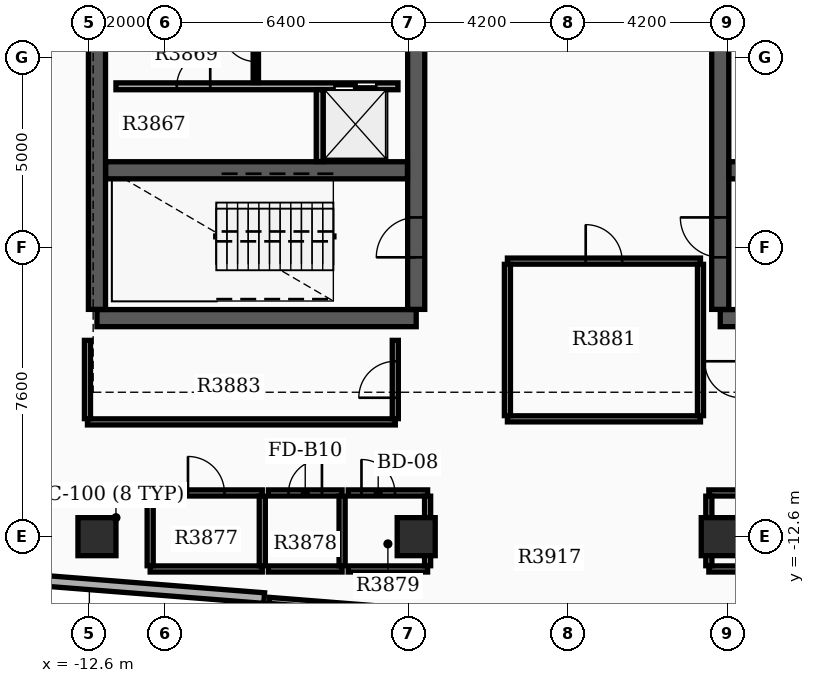
"""IFC4 building model, lengths in metres.
Left out: names, types, materials, properties, quantities, classifications, styles, units other than length and angle.
Written with IfcOpenShell. Run it as: python <this file> out.ifc"""

import sys

from ifc_helpers import new_model, si_unit, direction, frame, frame_2d, origin, origin_2d, place, context, subcontext, project, spatial, rectangle, extrude, element, fill, save


model = new_model("IFC4")
c1 = context("Model", 3, precision=1e-05, world=origin(), true_north=direction((0.0, 1.0)))
c2 = subcontext(c1, "Body", "Model", "MODEL_VIEW")
j1 = project(units=[si_unit("LENGTHUNIT", "METRE"), si_unit("PLANEANGLEUNIT", "RADIAN")], contexts=[c1])
p1 = place(None, origin())
s1 = spatial("IfcSite", under=j1, at=p1, CompositionType="ELEMENT")
p2 = place(p1, origin())
s2 = spatial("IfcBuilding", under=s1, at=p2, CompositionType="ELEMENT")
p3 = place(p2, frame((0.0, 0.0, 245.4)))
s3 = spatial("IfcBuildingStorey", under=s2, at=p3, CompositionType="ELEMENT", Elevation=245.4)
p4 = place(p3, frame((-12.4, -6.85, 0.0), z_axis=(0.0, 0.0, 1.0), x_axis=(1.0, 0.0, 0.0)))
e1 = element("IfcWall", 1, at=p4, inside=s3, PredefinedType="SHEAR", context=c2, shape_type="SweptSolid", body=[
    extrude(rectangle(XDim=8.4, YDim=0.45, at=frame_2d((4.2, 0.0))), origin(), (0.0, 0.0, 1.0), 4.3),
])
p5 = place(p3, frame((-12.4, -6.62, 0.0), z_axis=(0.0, 0.0, 1.0), x_axis=(0.0, 1.0, 0.0)))
e2 = element("IfcWall", 2, at=p5, inside=s3, PredefinedType="SHEAR", context=c2, shape_type="SweptSolid", body=[
    extrude(rectangle(XDim=11.34, YDim=0.45, at=frame_2d((5.67, 0.0))), origin(), (0.0, 0.0, 1.0), 4.3),
])
p6 = place(p3, frame((-4.0, -6.62, 0.0), z_axis=(0.0, 0.0, 1.0), x_axis=(0.0, 1.0, 0.0)))
e3 = element("IfcWall", 3, at=p6, inside=s3, PredefinedType="SHEAR", context=c2, shape_type="SweptSolid", body=[
    extrude(rectangle(XDim=11.34, YDim=0.45, at=frame_2d((5.67, 0.0))), origin(), (0.0, 0.0, 1.0), 4.3),
])
p7 = place(p6, frame((1.37, 0.0, 0.0)))
e4 = element("IfcOpeningElement", 4, at=p7, cuts=e3, PredefinedType="OPENING", context=c2, shape_type="SweptSolid", body=[
    extrude(rectangle(XDim=1.05, YDim=2.15, at=frame_2d((0.525, 1.075))), frame((0.0, 0.235, 0.0), z_axis=(0.0, -1.0, 0.0), x_axis=(1.0, 0.0, 0.0)), (0.0, 0.0, 1.0), 0.47),
])
p8 = place(p6, frame((6.97, 0.0, 0.0)))
e5 = element("IfcOpeningElement", 5, at=p8, cuts=e3, PredefinedType="OPENING", context=c2, shape_type="SweptSolid", body=[
    extrude(rectangle(XDim=1.05, YDim=2.15, at=frame_2d((0.525, 1.075))), frame((0.0, 0.235, 0.0), z_axis=(0.0, -1.0, 0.0), x_axis=(1.0, 0.0, 0.0)), (0.0, 0.0, 1.0), 0.47),
])
p9 = place(p3, frame((-12.17, -2.96, 0.0), z_axis=(0.0, 0.0, 1.0), x_axis=(1.0, 0.0, 0.0)))
e6 = element("IfcWall", 6, at=p9, inside=s3, PredefinedType="SHEAR", context=c2, shape_type="SweptSolid", body=[
    extrude(rectangle(XDim=7.94, YDim=0.45, at=frame_2d((3.97, 0.0))), origin(), (0.0, 0.0, 1.0), 4.3),
])
p10 = place(p3, frame((4.0, -6.85, 0.0), z_axis=(0.0, 0.0, 1.0), x_axis=(1.0, 0.0, 0.0)))
e7 = element("IfcWall", 7, at=p10, inside=s3, PredefinedType="SHEAR", context=c2, shape_type="SweptSolid", body=[
    extrude(rectangle(XDim=8.4, YDim=0.45, at=frame_2d((4.2, 0.0))), origin(), (0.0, 0.0, 1.0), 4.3),
])
p11 = place(p3, frame((4.0, -6.62, 0.0), z_axis=(0.0, 0.0, 1.0), x_axis=(0.0, 1.0, 0.0)))
e8 = element("IfcWall", 8, at=p11, inside=s3, PredefinedType="SHEAR", context=c2, shape_type="SweptSolid", body=[
    extrude(rectangle(XDim=11.34, YDim=0.45, at=frame_2d((5.67, 0.0))), origin(), (0.0, 0.0, 1.0), 4.3),
])
p12 = place(p11, frame((1.37, 0.0, 0.0)))
e9 = element("IfcOpeningElement", 9, at=p12, cuts=e8, PredefinedType="OPENING", context=c2, shape_type="SweptSolid", body=[
    extrude(rectangle(XDim=1.05, YDim=2.15, at=frame_2d((0.525, 1.075))), frame((0.0, 0.235, 0.0), z_axis=(0.0, -1.0, 0.0), x_axis=(1.0, 0.0, 0.0)), (0.0, 0.0, 1.0), 0.47),
])
p13 = place(p11, frame((6.97, 0.0, 0.0)))
e10 = element("IfcOpeningElement", 10, at=p13, cuts=e8, PredefinedType="OPENING", context=c2, shape_type="SweptSolid", body=[
    extrude(rectangle(XDim=1.05, YDim=2.15, at=frame_2d((0.525, 1.075))), frame((0.0, 0.235, 0.0), z_axis=(0.0, -1.0, 0.0), x_axis=(1.0, 0.0, 0.0)), (0.0, 0.0, 1.0), 0.47),
])
p14 = place(p3, frame((4.23, -2.96, 0.0), z_axis=(0.0, 0.0, 1.0), x_axis=(1.0, 0.0, 0.0)))
e11 = element("IfcWall", 11, at=p14, inside=s3, PredefinedType="SHEAR", context=c2, shape_type="SweptSolid", body=[
    extrude(rectangle(XDim=7.94, YDim=0.45, at=frame_2d((3.97, 0.0))), origin(), (0.0, 0.0, 1.0), 4.3),
])
for number, where, z_axis, x_axis in (
    (12, (-12.4, -12.6, 0.0), (0.0, 0.0, 1.0), (1.0, 0.0, 0.0)),
    (13, (-4.0, -12.6, 0.0), (0.0, 0.0, 1.0), (1.0, 0.0, 0.0)),
    (14, (4.0, -12.6, 0.0), (0.0, 0.0, 1.0), (1.0, 0.0, 0.0)),
):
    element("IfcColumn", number, at=place(p3, frame(where, z_axis=z_axis, x_axis=x_axis)), inside=s3, PredefinedType="COLUMN", context=c2, shape_type="SweptSolid", body=[
        extrude(rectangle(XDim=1.0, YDim=1.0, at=origin_2d()), origin(), (0.0, 0.0, 1.0), 4.5),
    ])
p15 = place(p3, frame((-7.872, -14.367, 0.0), z_axis=(0.0, 0.0, 1.0), x_axis=(-0.078456642068, -0.996917526837, 0.0)))
e15 = element("IfcWall", 15, at=p15, inside=s3, PredefinedType="STANDARD", context=c2, shape_type="SweptSolid", body=[
    extrude(rectangle(XDim=14.7, YDim=0.28, at=frame_2d((7.35, 0.0))), origin(), (0.0, 0.0, 1.0), 3.38),
])
p16 = place(p15, frame((1.6, 0.0, 0.8)))
e16 = element("IfcOpeningElement", 16, at=p16, cuts=e15, PredefinedType="OPENING", context=c2, shape_type="SweptSolid", body=[
    extrude(rectangle(XDim=1.6, YDim=1.7, at=frame_2d((0.8, 0.85))), frame((0.0, 0.15, 0.0), z_axis=(0.0, -1.0, 0.0), x_axis=(1.0, 0.0, 0.0)), (0.0, 0.0, 1.0), 0.3),
])
p17 = place(p15, frame((4.8, 0.0, 0.8)))
e17 = element("IfcOpeningElement", 17, at=p17, cuts=e15, PredefinedType="OPENING", context=c2, shape_type="SweptSolid", body=[
    extrude(rectangle(XDim=1.6, YDim=1.7, at=frame_2d((0.8, 0.85))), frame((0.0, 0.15, 0.0), z_axis=(0.0, -1.0, 0.0), x_axis=(1.0, 0.0, 0.0)), (0.0, 0.0, 1.0), 0.3),
])
p18 = place(p15, frame((8.75, 0.0, 0.8)))
e18 = element("IfcOpeningElement", 18, at=p18, cuts=e15, PredefinedType="OPENING", context=c2, shape_type="SweptSolid", body=[
    extrude(rectangle(XDim=1.6, YDim=1.7, at=frame_2d((0.8, 0.85))), frame((0.0, 0.15, 0.0), z_axis=(0.0, -1.0, 0.0), x_axis=(1.0, 0.0, 0.0)), (0.0, 0.0, 1.0), 0.3),
])
p19 = place(p15, frame((11.95, 0.0, 0.8)))
e19 = element("IfcOpeningElement", 19, at=p19, cuts=e15, PredefinedType="OPENING", context=c2, shape_type="SweptSolid", body=[
    extrude(rectangle(XDim=1.6, YDim=1.7, at=frame_2d((0.8, 0.85))), frame((0.0, 0.15, 0.0), z_axis=(0.0, -1.0, 0.0), x_axis=(1.0, 0.0, 0.0)), (0.0, 0.0, 1.0), 0.3),
])
p20 = place(p3, frame((-14.281, -13.722, 0.0), z_axis=(0.0, 0.0, 1.0), x_axis=(0.99691915642, -0.078435932851, 0.0)))
e20 = element("IfcWall", 20, at=p20, inside=s3, PredefinedType="STANDARD", context=c2, shape_type="SweptSolid", body=[
    extrude(rectangle(XDim=6.3, YDim=0.28, at=frame_2d((3.15, 0.0))), origin(), (0.0, 0.0, 1.0), 3.38),
])
p21 = place(p3, frame((-11.9, -0.75, 0.0), z_axis=(0.0, 0.0, 1.0), x_axis=(1.0, 0.0, 0.0)))
e21 = element("IfcWall", 21, at=p21, inside=s3, PredefinedType="SOLIDWALL", context=c2, shape_type="SweptSolid", body=[
    extrude(rectangle(XDim=7.42, YDim=0.18, at=frame_2d((3.71, 0.0))), origin(), (0.0, 0.0, 1.0), 3.37),
])
p22 = place(p21, frame((5.75, 0.0, 0.0)))
e22 = element("IfcOpeningElement", 22, at=p22, cuts=e21, PredefinedType="OPENING", context=c2, shape_type="SweptSolid", body=[
    extrude(rectangle(XDim=1.1, YDim=2.15, at=frame_2d((0.55, 1.075))), frame((0.0, 0.1, 0.0), z_axis=(0.0, -1.0, 0.0), x_axis=(1.0, 0.0, 0.0)), (0.0, 0.0, 1.0), 0.2),
])
p23 = place(p21, frame((1.6, 0.0, 0.0)))
e23 = element("IfcOpeningElement", 23, at=p23, cuts=e21, PredefinedType="OPENING", context=c2, shape_type="SweptSolid", body=[
    extrude(rectangle(XDim=0.88, YDim=2.1, at=frame_2d((0.44, 1.05))), frame((0.0, 0.1, 0.0), z_axis=(0.0, -1.0, 0.0), x_axis=(1.0, 0.0, 0.0)), (0.0, 0.0, 1.0), 0.2),
])
p24 = place(p3, frame((-6.54, -2.73, 0.0), z_axis=(0.0, 0.0, 1.0), x_axis=(0.0, 1.0, 0.0)))
e24 = element("IfcWall", 24, at=p24, inside=s3, PredefinedType="SOLIDWALL", context=c2, shape_type="SweptSolid", body=[
    extrude(rectangle(XDim=1.89, YDim=0.18, at=frame_2d((0.945, 0.0))), origin(), (0.0, 0.0, 1.0), 3.37),
])
p25 = place(p3, frame((-8.22, -0.65, 0.0), z_axis=(0.0, 0.0, 1.0), x_axis=(0.0, 1.0, 0.0)))
e25 = element("IfcWall", 25, at=p25, inside=s3, PredefinedType="SOLIDWALL", context=c2, shape_type="SweptSolid", body=[
    extrude(rectangle(XDim=2.96, YDim=0.14, at=frame_2d((1.48, 0.0))), origin(), (0.0, 0.0, 1.0), 3.37),
])
p26 = place(p25, frame((0.55, 0.0, 0.0)))
e26 = element("IfcOpeningElement", 26, at=p26, cuts=e25, PredefinedType="OPENING", context=c2, shape_type="SweptSolid", body=[
    extrude(rectangle(XDim=0.88, YDim=2.1, at=frame_2d((0.44, 1.05))), frame((0.0, 0.08, 0.0), z_axis=(0.0, -1.0, 0.0), x_axis=(1.0, 0.0, 0.0)), (0.0, 0.0, 1.0), 0.16),
])
p27 = place(p3, frame((3.7, -13.45, 0.0), z_axis=(0.0, 0.0, 1.0), x_axis=(1.0, 0.0, 0.0)))
e27 = element("IfcWall", 27, at=p27, inside=s3, PredefinedType="PARTITIONING", context=c2, shape_type="SweptSolid", body=[
    extrude(rectangle(XDim=7.3, YDim=0.16, at=frame_2d((3.65, 0.0))), origin(), (0.0, 0.0, 1.0), 3.37),
])
p28 = place(p3, frame((3.7, -11.45, 0.0), z_axis=(0.0, 0.0, 1.0), x_axis=(1.0, 0.0, 0.0)))
e28 = element("IfcWall", 28, at=p28, inside=s3, PredefinedType="PARTITIONING", context=c2, shape_type="SweptSolid", body=[
    extrude(rectangle(XDim=7.3, YDim=0.16, at=frame_2d((3.65, 0.0))), origin(), (0.0, 0.0, 1.0), 3.37),
])
p29 = place(p28, frame((3.17, 0.0, 0.0)))
e29 = element("IfcOpeningElement", 29, at=p29, cuts=e28, PredefinedType="OPENING", context=c2, shape_type="SweptSolid", body=[
    extrude(rectangle(XDim=0.96, YDim=2.15, at=frame_2d((0.48, 1.075))), frame((0.0, 0.09, 0.0), z_axis=(0.0, -1.0, 0.0), x_axis=(1.0, 0.0, 0.0)), (0.0, 0.0, 1.0), 0.18),
])
p30 = place(p3, frame((3.7, -13.365, 0.0), z_axis=(0.0, 0.0, 1.0), x_axis=(0.0, 1.0, 0.0)))
e30 = element("IfcWall", 30, at=p30, inside=s3, PredefinedType="PARTITIONING", context=c2, shape_type="SweptSolid", body=[
    extrude(rectangle(XDim=1.83, YDim=0.16, at=frame_2d((0.915, 0.0))), origin(), (0.0, 0.0, 1.0), 3.37),
])
p31 = place(p3, frame((-11.0, -13.45, 0.0), z_axis=(0.0, 0.0, 1.0), x_axis=(1.0, 0.0, 0.0)))
e31 = element("IfcWall", 31, at=p31, inside=s3, PredefinedType="PARTITIONING", context=c2, shape_type="SweptSolid", body=[
    extrude(rectangle(XDim=2.95, YDim=0.16, at=frame_2d((1.475, 0.0))), origin(), (0.0, 0.0, 1.0), 3.37),
])
p32 = place(p3, frame((-11.0, -11.45, 0.0), z_axis=(0.0, 0.0, 1.0), x_axis=(1.0, 0.0, 0.0)))
e32 = element("IfcWall", 32, at=p32, inside=s3, PredefinedType="PARTITIONING", context=c2, shape_type="SweptSolid", body=[
    extrude(rectangle(XDim=2.95, YDim=0.16, at=frame_2d((1.475, 0.0))), origin(), (0.0, 0.0, 1.0), 3.37),
])
p33 = place(p32, frame((0.995, 0.0, 0.0)))
e33 = element("IfcOpeningElement", 33, at=p33, cuts=e32, PredefinedType="OPENING", context=c2, shape_type="SweptSolid", body=[
    extrude(rectangle(XDim=0.96, YDim=2.15, at=frame_2d((0.48, 1.075))), frame((0.0, 0.09, 0.0), z_axis=(0.0, -1.0, 0.0), x_axis=(1.0, 0.0, 0.0)), (0.0, 0.0, 1.0), 0.18),
])
for number, where, z_axis, x_axis in (
    (34, (-11.0, -13.365, 0.0), (0.0, 0.0, 1.0), (0.0, 1.0, 0.0)),
    (35, (-8.05, -13.365, 0.0), (0.0, 0.0, 1.0), (0.0, 1.0, 0.0)),
):
    element("IfcWall", number, at=place(p3, frame(where, z_axis=z_axis, x_axis=x_axis)), inside=s3, PredefinedType="PARTITIONING", context=c2, shape_type="SweptSolid", body=[
        extrude(rectangle(XDim=1.83, YDim=0.16, at=frame_2d((0.915, 0.0))), origin(), (0.0, 0.0, 1.0), 3.37),
    ])
p34 = place(p3, frame((-7.89, -13.45, 0.0), z_axis=(0.0, 0.0, 1.0), x_axis=(1.0, 0.0, 0.0)))
e36 = element("IfcWall", 36, at=p34, inside=s3, PredefinedType="PARTITIONING", context=c2, shape_type="SweptSolid", body=[
    extrude(rectangle(XDim=1.94, YDim=0.16, at=frame_2d((0.97, 0.0))), origin(), (0.0, 0.0, 1.0), 3.37),
])
p35 = place(p3, frame((-7.89, -11.45, 0.0), z_axis=(0.0, 0.0, 1.0), x_axis=(1.0, 0.0, 0.0)))
e37 = element("IfcWall", 37, at=p35, inside=s3, PredefinedType="PARTITIONING", context=c2, shape_type="SweptSolid", body=[
    extrude(rectangle(XDim=1.94, YDim=0.16, at=frame_2d((0.97, 0.0))), origin(), (0.0, 0.0, 1.0), 3.37),
])
p36 = place(p35, frame((0.53, 0.0, 0.0)))
e38 = element("IfcOpeningElement", 38, at=p36, cuts=e37, PredefinedType="OPENING", context=c2, shape_type="SweptSolid", body=[
    extrude(rectangle(XDim=0.88, YDim=2.1, at=frame_2d((0.44, 1.05))), frame((0.0, 0.09, 0.0), z_axis=(0.0, -1.0, 0.0), x_axis=(1.0, 0.0, 0.0)), (0.0, 0.0, 1.0), 0.18),
])
p37 = place(p3, frame((-5.95, -13.365, 0.0), z_axis=(0.0, 0.0, 1.0), x_axis=(0.0, 1.0, 0.0)))
e39 = element("IfcWall", 39, at=p37, inside=s3, PredefinedType="PARTITIONING", context=c2, shape_type="SweptSolid", body=[
    extrude(rectangle(XDim=1.83, YDim=0.16, at=frame_2d((0.915, 0.0))), origin(), (0.0, 0.0, 1.0), 3.37),
])
p38 = place(p3, frame((-5.79, -13.45, 0.0), z_axis=(0.0, 0.0, 1.0), x_axis=(1.0, 0.0, 0.0)))
e40 = element("IfcWall", 40, at=p38, inside=s3, PredefinedType="PARTITIONING", context=c2, shape_type="SweptSolid", body=[
    extrude(rectangle(XDim=2.09, YDim=0.16, at=frame_2d((1.045, 0.0))), origin(), (0.0, 0.0, 1.0), 3.37),
])
p39 = place(p3, frame((-5.79, -11.45, 0.0), z_axis=(0.0, 0.0, 1.0), x_axis=(1.0, 0.0, 0.0)))
e41 = element("IfcWall", 41, at=p39, inside=s3, PredefinedType="PARTITIONING", context=c2, shape_type="SweptSolid", body=[
    extrude(rectangle(XDim=2.09, YDim=0.16, at=frame_2d((1.045, 0.0))), origin(), (0.0, 0.0, 1.0), 3.37),
])
p40 = place(p39, frame((0.35, 0.0, 0.0)))
e42 = element("IfcOpeningElement", 42, at=p40, cuts=e41, PredefinedType="OPENING", context=c2, shape_type="SweptSolid", body=[
    extrude(rectangle(XDim=0.88, YDim=2.15, at=frame_2d((0.44, 1.075))), frame((0.0, 0.09, 0.0), z_axis=(0.0, -1.0, 0.0), x_axis=(1.0, 0.0, 0.0)), (0.0, 0.0, 1.0), 0.18),
])
p41 = place(p3, frame((-3.7, -13.365, 0.0), z_axis=(0.0, 0.0, 1.0), x_axis=(0.0, 1.0, 0.0)))
e43 = element("IfcWall", 43, at=p41, inside=s3, PredefinedType="PARTITIONING", context=c2, shape_type="SweptSolid", body=[
    extrude(rectangle(XDim=1.83, YDim=0.16, at=frame_2d((0.915, 0.0))), origin(), (0.0, 0.0, 1.0), 3.37),
])
p42 = place(p3, frame((-1.6, -9.5, 0.0), z_axis=(0.0, 0.0, 1.0), x_axis=(1.0, 0.0, 0.0)))
e44 = element("IfcWall", 44, at=p42, inside=s3, PredefinedType="PARTITIONING", context=c2, shape_type="SweptSolid", body=[
    extrude(rectangle(XDim=5.08, YDim=0.16, at=frame_2d((2.54, 0.0))), origin(), (0.0, 0.0, 1.0), 3.37),
])
p43 = place(p3, frame((-1.6, -5.35, 0.0), z_axis=(0.0, 0.0, 1.0), x_axis=(1.0, 0.0, 0.0)))
e45 = element("IfcWall", 45, at=p43, inside=s3, PredefinedType="PARTITIONING", context=c2, shape_type="SweptSolid", body=[
    extrude(rectangle(XDim=5.08, YDim=0.16, at=frame_2d((2.54, 0.0))), origin(), (0.0, 0.0, 1.0), 3.37),
])
p44 = place(p43, frame((2.06, 0.0, 0.0)))
e46 = element("IfcOpeningElement", 46, at=p44, cuts=e45, PredefinedType="OPENING", context=c2, shape_type="SweptSolid", body=[
    extrude(rectangle(XDim=0.96, YDim=2.15, at=frame_2d((0.48, 1.075))), frame((0.0, 0.09, 0.0), z_axis=(0.0, -1.0, 0.0), x_axis=(1.0, 0.0, 0.0)), (0.0, 0.0, 1.0), 0.18),
])
for number, where, z_axis, x_axis in (
    (47, (-1.6, -9.415, 0.0), (0.0, 0.0, 1.0), (0.0, 1.0, 0.0)),
    (48, (3.48, -9.415, 0.0), (0.0, 0.0, 1.0), (0.0, 1.0, 0.0)),
):
    element("IfcWall", number, at=place(p3, frame(where, z_axis=z_axis, x_axis=x_axis)), inside=s3, PredefinedType="PARTITIONING", context=c2, shape_type="SweptSolid", body=[
        extrude(rectangle(XDim=3.98, YDim=0.16, at=frame_2d((1.99, 0.0))), origin(), (0.0, 0.0, 1.0), 3.37),
    ])
p45 = place(p3, frame((-12.65, -9.58, 0.0), z_axis=(0.0, 0.0, 1.0), x_axis=(1.0, 0.0, 0.0)))
e49 = element("IfcWall", 49, at=p45, inside=s3, PredefinedType="PARTITIONING", context=c2, shape_type="SweptSolid", body=[
    extrude(rectangle(XDim=8.1, YDim=0.16, at=frame_2d((4.05, 0.0))), origin(), (0.0, 0.0, 1.0), 3.37),
])
p46 = place(p3, frame((-12.65, -9.495, 0.0), z_axis=(0.0, 0.0, 1.0), x_axis=(0.0, 1.0, 0.0)))
e50 = element("IfcWall", 50, at=p46, inside=s3, PredefinedType="PARTITIONING", context=c2, shape_type="SweptSolid", body=[
    extrude(rectangle(XDim=2.06, YDim=0.16, at=frame_2d((1.03, 0.0))), origin(), (0.0, 0.0, 1.0), 3.37),
])
p47 = place(p3, frame((-4.55, -9.495, 0.0), z_axis=(0.0, 0.0, 1.0), x_axis=(0.0, 1.0, 0.0)))
e51 = element("IfcWall", 51, at=p47, inside=s3, PredefinedType="PARTITIONING", context=c2, shape_type="SweptSolid", body=[
    extrude(rectangle(XDim=2.06, YDim=0.16, at=frame_2d((1.03, 0.0))), origin(), (0.0, 0.0, 1.0), 3.37),
])
p48 = place(p47, frame((0.55, 0.0, 0.0)))
e52 = element("IfcOpeningElement", 52, at=p48, cuts=e51, PredefinedType="OPENING", context=c2, shape_type="SweptSolid", body=[
    extrude(rectangle(XDim=0.96, YDim=2.15, at=frame_2d((0.48, 1.075))), frame((0.0, 0.09, 0.0), z_axis=(0.0, -1.0, 0.0), x_axis=(1.0, 0.0, 0.0)), (0.0, 0.0, 1.0), 0.18),
])
p49 = place(p3, frame((-1.285, -14.795, 0.0), z_axis=(0.0, 0.0, 1.0), x_axis=(-0.996917593255, 0.078455798126, 0.0)))
e53 = element("IfcWall", 53, at=p49, inside=s3, PredefinedType="PARTITIONING", context=c2, shape_type="SweptSolid", body=[
    extrude(rectangle(XDim=6.6, YDim=0.16, at=frame_2d((3.3, 0.0))), origin(), (0.0, 0.0, 1.0), 3.37),
])
p50 = place(p7, origin())
e54 = element("IfcDoor", 54, at=p50, inside=s3, OperationType="SINGLE_SWING_LEFT", PredefinedType="DOOR", context=c2, shape_type="SweptSolid", body=[
    extrude(rectangle(XDim=1.05, YDim=2.15, at=frame_2d((0.525, 1.075))), frame((0.0, 0.025, 0.0), z_axis=(0.0, -1.0, 0.0), x_axis=(1.0, 0.0, 0.0)), (0.0, 0.0, 1.0), 0.05),
])
fill(e4, e54)
p51 = place(p12, origin())
e55 = element("IfcDoor", 55, at=p51, inside=s3, OperationType="SINGLE_SWING_RIGHT", PredefinedType="DOOR", context=c2, shape_type="SweptSolid", body=[
    extrude(rectangle(XDim=1.05, YDim=2.15, at=frame_2d((0.525, 1.075))), frame((0.0, 0.025, 0.0), z_axis=(0.0, -1.0, 0.0), x_axis=(1.0, 0.0, 0.0)), (0.0, 0.0, 1.0), 0.05),
])
fill(e9, e55)
p52 = place(p22, origin())
e56 = element("IfcDoor", 56, at=p52, inside=s3, OperationType="DOUBLE_DOOR_SLIDING", PredefinedType="DOOR", context=c2, shape_type="SweptSolid", body=[
    extrude(rectangle(XDim=1.1, YDim=2.15, at=frame_2d((0.55, 1.075))), frame((0.0, 0.025, 0.0), z_axis=(0.0, -1.0, 0.0), x_axis=(1.0, 0.0, 0.0)), (0.0, 0.0, 1.0), 0.05),
])
fill(e22, e56)
p53 = place(p23, origin())
e57 = element("IfcDoor", 57, at=p53, inside=s3, OperationType="SINGLE_SWING_RIGHT", PredefinedType="DOOR", context=c2, shape_type="SweptSolid", body=[
    extrude(rectangle(XDim=0.88, YDim=2.1, at=frame_2d((0.44, 1.05))), frame((0.0, 0.025, 0.0), z_axis=(0.0, -1.0, 0.0), x_axis=(1.0, 0.0, 0.0)), (0.0, 0.0, 1.0), 0.05),
])
fill(e23, e57)
p54 = place(p26, origin())
e58 = element("IfcDoor", 58, at=p54, inside=s3, OperationType="SINGLE_SWING_RIGHT", PredefinedType="DOOR", context=c2, shape_type="SweptSolid", body=[
    extrude(rectangle(XDim=0.88, YDim=2.1, at=frame_2d((0.44, 1.05))), frame((0.0, 0.025, 0.0), z_axis=(0.0, -1.0, 0.0), x_axis=(1.0, 0.0, 0.0)), (0.0, 0.0, 1.0), 0.05),
])
fill(e26, e58)
p55 = place(p33, origin())
e59 = element("IfcDoor", 59, at=p55, inside=s3, OperationType="SINGLE_SWING_LEFT", PredefinedType="DOOR", context=c2, shape_type="SweptSolid", body=[
    extrude(rectangle(XDim=0.96, YDim=2.15, at=frame_2d((0.48, 1.075))), frame((0.0, 0.025, 0.0), z_axis=(0.0, -1.0, 0.0), x_axis=(1.0, 0.0, 0.0)), (0.0, 0.0, 1.0), 0.05),
])
fill(e33, e59)
p56 = place(p36, origin())
e60 = element("IfcDoor", 60, at=p56, inside=s3, OperationType="SINGLE_SWING_RIGHT", PredefinedType="DOOR", context=c2, shape_type="SweptSolid", body=[
    extrude(rectangle(XDim=0.88, YDim=2.1, at=frame_2d((0.44, 1.05))), frame((0.0, 0.025, 0.0), z_axis=(0.0, -1.0, 0.0), x_axis=(1.0, 0.0, 0.0)), (0.0, 0.0, 1.0), 0.05),
])
fill(e38, e60)
p57 = place(p40, origin())
e61 = element("IfcDoor", 61, at=p57, inside=s3, OperationType="SINGLE_SWING_LEFT", PredefinedType="DOOR", context=c2, shape_type="SweptSolid", body=[
    extrude(rectangle(XDim=0.88, YDim=2.15, at=frame_2d((0.44, 1.075))), frame((0.0, 0.025, 0.0), z_axis=(0.0, -1.0, 0.0), x_axis=(1.0, 0.0, 0.0)), (0.0, 0.0, 1.0), 0.05),
])
fill(e42, e61)
p58 = place(p44, origin())
e62 = element("IfcDoor", 62, at=p58, inside=s3, OperationType="SINGLE_SWING_LEFT", PredefinedType="DOOR", context=c2, shape_type="SweptSolid", body=[
    extrude(rectangle(XDim=0.96, YDim=2.15, at=frame_2d((0.48, 1.075))), frame((0.0, 0.025, 0.0), z_axis=(0.0, -1.0, 0.0), x_axis=(1.0, 0.0, 0.0)), (0.0, 0.0, 1.0), 0.05),
])
fill(e46, e62)
p59 = place(p48, origin())
e63 = element("IfcDoor", 63, at=p59, inside=s3, OperationType="SINGLE_SWING_LEFT", PredefinedType="DOOR", context=c2, shape_type="SweptSolid", body=[
    extrude(rectangle(XDim=0.96, YDim=2.15, at=frame_2d((0.48, 1.075))), frame((0.0, 0.025, 0.0), z_axis=(0.0, -1.0, 0.0), x_axis=(1.0, 0.0, 0.0)), (0.0, 0.0, 1.0), 0.05),
])
fill(e52, e63)
save(model, sys.argv[1])
